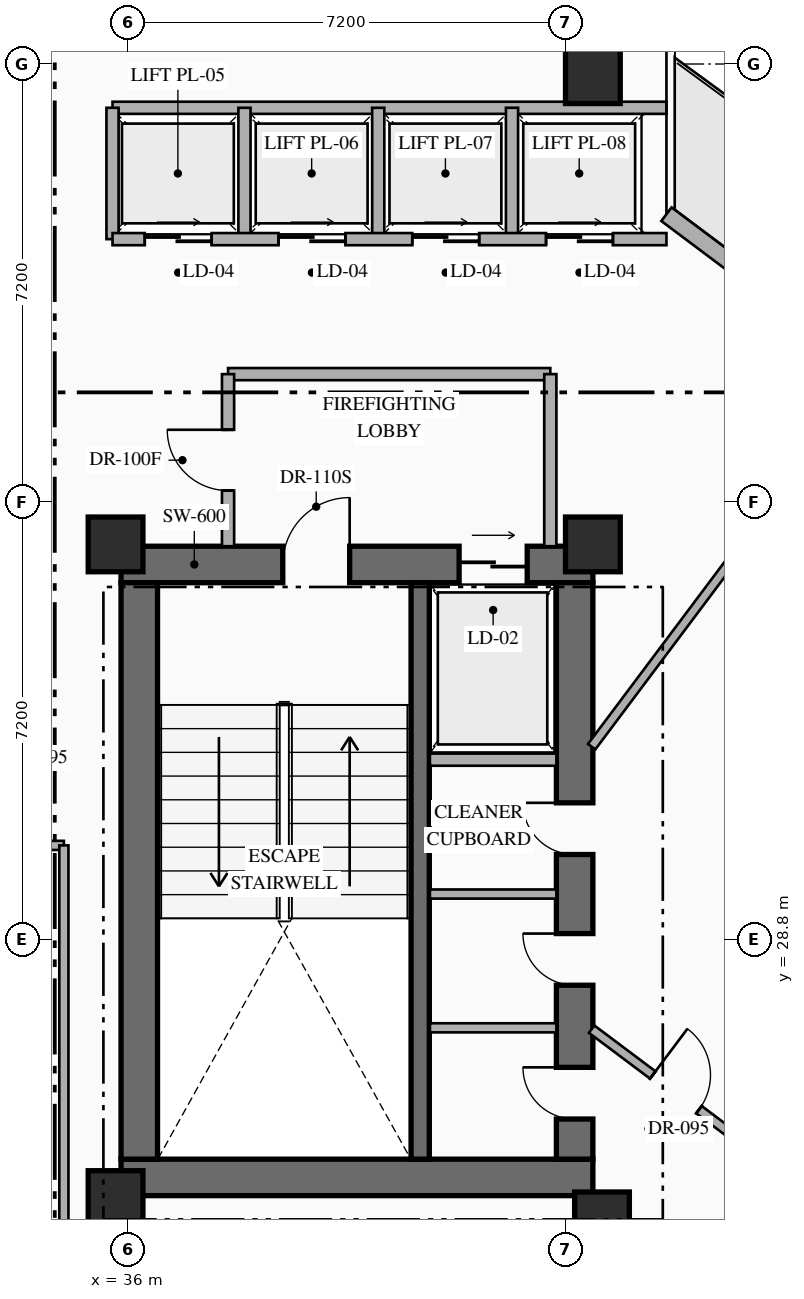
"""IFC4 building model, lengths in metres.
Left out: names, types, materials, properties, quantities, classifications, styles, units other than length and angle.
Written with IfcOpenShell. Run it as: python <this file> out.ifc"""

import sys

from ifc_helpers import new_model, si_unit, direction, frame, frame_2d, origin, origin_2d, place, context, subcontext, project, spatial, rectangle, extrude, element, fill, save


model = new_model("IFC4")
c1 = context("Model", 3, precision=1e-05, world=origin(), true_north=direction((0.0, 1.0)))
c2 = subcontext(c1, "Body", "Model", "MODEL_VIEW")
j1 = project(units=[si_unit("LENGTHUNIT", "METRE"), si_unit("PLANEANGLEUNIT", "RADIAN")], contexts=[c1])
p1 = place(None, origin())
s1 = spatial("IfcSite", under=j1, at=p1, CompositionType="ELEMENT")
p2 = place(p1, origin())
s2 = spatial("IfcBuilding", under=s1, at=p2, CompositionType="ELEMENT")
p3 = place(p2, frame((0.0, 0.0, 138.45)))
s3 = spatial("IfcBuildingStorey", under=s2, at=p3, CompositionType="ELEMENT", Elevation=138.45)
p4 = place(p3, frame((35.89, 24.89, 0.0), z_axis=(0.0, 0.0, 1.0), x_axis=(1.0, 0.0, 0.0)))
e1 = element("IfcWall", 1, at=p4, inside=s3, PredefinedType="SHEAR", context=c2, shape_type="SweptSolid", body=[
    extrude(rectangle(XDim=7.76, YDim=0.6, at=frame_2d((3.88, 0.0))), origin(), (0.0, 0.0, 1.0), 3.6),
])
p5 = place(p3, frame((35.89, 34.97, 0.0), z_axis=(0.0, 0.0, 1.0), x_axis=(1.0, 0.0, 0.0)))
e2 = element("IfcWall", 2, at=p5, inside=s3, PredefinedType="SHEAR", context=c2, shape_type="SweptSolid", body=[
    extrude(rectangle(XDim=7.76, YDim=0.6, at=frame_2d((3.88, 0.0))), origin(), (0.0, 0.0, 1.0), 3.6),
])
p6 = place(p5, frame((2.66, 0.0, 0.0)))
e3 = element("IfcOpeningElement", 3, at=p6, cuts=e2, PredefinedType="OPENING", context=c2, shape_type="SweptSolid", body=[
    extrude(rectangle(XDim=1.1, YDim=2.2, at=frame_2d((0.55, 1.1))), frame((0.0, 0.31, 0.0), z_axis=(0.0, -1.0, 0.0), x_axis=(1.0, 0.0, 0.0)), (0.0, 0.0, 1.0), 0.62),
])
p7 = place(p5, frame((5.56, 0.0, 0.0)))
e4 = element("IfcOpeningElement", 4, at=p7, cuts=e2, PredefinedType="OPENING", context=c2, shape_type="SweptSolid", body=[
    extrude(rectangle(XDim=1.12, YDim=2.15, at=frame_2d((0.56, 1.075))), frame((0.0, 0.31, 0.0), z_axis=(0.0, -1.0, 0.0), x_axis=(1.0, 0.0, 0.0)), (0.0, 0.0, 1.0), 0.62),
])
p8 = place(p3, frame((36.19, 25.19, 0.0), z_axis=(0.0, 0.0, 1.0), x_axis=(0.0, 1.0, 0.0)))
e5 = element("IfcWall", 5, at=p8, inside=s3, PredefinedType="SHEAR", context=c2, shape_type="SweptSolid", body=[
    extrude(rectangle(XDim=9.48, YDim=0.6, at=frame_2d((4.74, 0.0))), origin(), (0.0, 0.0, 1.0), 3.6),
])
p9 = place(p3, frame((43.35, 25.19, 0.0), z_axis=(0.0, 0.0, 1.0), x_axis=(0.0, 1.0, 0.0)))
e6 = element("IfcWall", 6, at=p9, inside=s3, PredefinedType="SHEAR", context=c2, shape_type="SweptSolid", body=[
    extrude(rectangle(XDim=9.48, YDim=0.6, at=frame_2d((4.74, 0.0))), origin(), (0.0, 0.0, 1.0), 3.6),
])
p10 = place(p9, frame((0.66, 0.0, 0.0)))
e7 = element("IfcOpeningElement", 7, at=p10, cuts=e6, PredefinedType="OPENING", context=c2, shape_type="SweptSolid", body=[
    extrude(rectangle(XDim=0.85, YDim=2.08, at=frame_2d((0.425, 1.04))), frame((0.0, 0.31, 0.0), z_axis=(0.0, -1.0, 0.0), x_axis=(1.0, 0.0, 0.0)), (0.0, 0.0, 1.0), 0.62),
])
p11 = place(p9, frame((2.86, 0.0, 0.0)))
e8 = element("IfcOpeningElement", 8, at=p11, cuts=e6, PredefinedType="OPENING", context=c2, shape_type="SweptSolid", body=[
    extrude(rectangle(XDim=0.85, YDim=2.08, at=frame_2d((0.425, 1.04))), frame((0.0, 0.31, 0.0), z_axis=(0.0, -1.0, 0.0), x_axis=(1.0, 0.0, 0.0)), (0.0, 0.0, 1.0), 0.62),
])
p12 = place(p9, frame((5.01, 0.0, 0.0)))
e9 = element("IfcOpeningElement", 9, at=p12, cuts=e6, PredefinedType="OPENING", context=c2, shape_type="SweptSolid", body=[
    extrude(rectangle(XDim=0.85, YDim=2.08, at=frame_2d((0.425, 1.04))), frame((0.0, 0.31, 0.0), z_axis=(0.0, -1.0, 0.0), x_axis=(1.0, 0.0, 0.0)), (0.0, 0.0, 1.0), 0.62),
])
p13 = place(p3, frame((40.81, 25.19, 0.0), z_axis=(0.0, 0.0, 1.0), x_axis=(0.0, 1.0, 0.0)))
e10 = element("IfcWall", 10, at=p13, inside=s3, PredefinedType="SHEAR", context=c2, shape_type="SweptSolid", body=[
    extrude(rectangle(XDim=9.48, YDim=0.3, at=frame_2d((4.74, 0.0))), origin(), (0.0, 0.0, 1.0), 3.6),
])
for number, where, z_axis, x_axis in (
    (11, (35.8, 24.55, 0.0), (0.0, 0.0, 1.0), (1.0, 0.0, 0.0)),
    (12, (43.8, 24.2, 0.0), (0.0, 0.0, 1.0), (1.0, 0.0, 0.0)),
    (13, (35.8, 35.3, 0.0), (0.0, 0.0, 1.0), (1.0, 0.0, 0.0)),
    (14, (43.65, 35.3, 0.0), (0.0, 0.0, 1.0), (1.0, 0.0, 0.0)),
    (15, (43.65, 43.0, 0.0), (0.0, 0.0, 1.0), (1.0, 0.0, 0.0)),
):
    element("IfcColumn", number, at=place(p3, frame(where, z_axis=z_axis, x_axis=x_axis)), inside=s3, PredefinedType="COLUMN", context=c2, shape_type="SweptSolid", body=[
        extrude(rectangle(XDim=0.9, YDim=0.9, at=origin_2d()), origin(), (0.0, 0.0, 1.0), 3.6),
    ])
p14 = place(p3, frame((44.86, 40.73, 0.0), z_axis=(0.0, 0.0, 1.0), x_axis=(0.800007624502, -0.599989833863, 0.0)))
e16 = element("IfcWall", 16, at=p14, inside=s3, PredefinedType="STANDARD", context=c2, shape_type="SweptSolid", body=[
    extrude(rectangle(XDim=19.212, YDim=0.28, at=frame_2d((9.606, 0.0))), origin(), (0.0, 0.0, 1.0), 3.35),
])
p15 = place(p14, frame((1.755, 0.0, 0.0)))
e17 = element("IfcOpeningElement", 17, at=p15, cuts=e16, PredefinedType="OPENING", context=c2, shape_type="SweptSolid", body=[
    extrude(rectangle(XDim=1.1, YDim=2.2, at=frame_2d((0.55, 1.1))), frame((0.0, 0.15, 0.0), z_axis=(0.0, -1.0, 0.0), x_axis=(1.0, 0.0, 0.0)), (0.0, 0.0, 1.0), 0.3),
])
p16 = place(p14, frame((13.509, 0.0, 0.85)))
e18 = element("IfcOpeningElement", 18, at=p16, cuts=e16, PredefinedType="OPENING", context=c2, shape_type="SweptSolid", body=[
    extrude(rectangle(XDim=1.8, YDim=2.1, at=frame_2d((0.9, 1.05))), frame((0.0, 0.15, 0.0), z_axis=(0.0, -1.0, 0.0), x_axis=(1.0, 0.0, 0.0)), (0.0, 0.0, 1.0), 0.3),
])
p17 = place(p3, frame((40.97, 31.76, 0.0), z_axis=(0.0, 0.0, 1.0), x_axis=(1.0, 0.0, 0.0)))
e19 = element("IfcWall", 19, at=p17, inside=s3, PredefinedType="STANDARD", context=c2, shape_type="SweptSolid", body=[
    extrude(rectangle(XDim=2.08, YDim=0.2, at=frame_2d((1.04, 0.0))), origin(), (0.0, 0.0, 1.0), 3.35),
])
for number, where, z_axis, x_axis in (
    (20, (40.97, 27.35, 0.0), (0.0, 0.0, 1.0), (1.0, 0.0, 0.0)),
    (21, (40.97, 29.55, 0.0), (0.0, 0.0, 1.0), (1.0, 0.0, 0.0)),
):
    element("IfcWall", number, at=place(p3, frame(where, z_axis=z_axis, x_axis=x_axis)), inside=s3, PredefinedType="PARTITIONING", context=c2, shape_type="SweptSolid", body=[
        extrude(rectangle(XDim=2.08, YDim=0.15, at=frame_2d((1.04, 0.0))), origin(), (0.0, 0.0, 1.0), 3.35),
    ])
p18 = place(p3, frame((37.65, 38.1, 0.0), z_axis=(0.0, 0.0, 1.0), x_axis=(1.0, 0.0, 0.0)))
e22 = element("IfcWall", 22, at=p18, inside=s3, PredefinedType="STANDARD", context=c2, shape_type="SweptSolid", body=[
    extrude(rectangle(XDim=5.3, YDim=0.2, at=frame_2d((2.65, 0.0))), origin(), (0.0, 0.0, 1.0), 3.35),
])
p19 = place(p3, frame((42.95, 35.27, 0.0), z_axis=(0.0, 0.0, 1.0), x_axis=(0.0, 1.0, 0.0)))
e23 = element("IfcWall", 23, at=p19, inside=s3, PredefinedType="STANDARD", context=c2, shape_type="SweptSolid", body=[
    extrude(rectangle(XDim=2.83, YDim=0.2, at=frame_2d((1.415, 0.0))), origin(), (0.0, 0.0, 1.0), 3.35),
])
p20 = place(p3, frame((37.65, 35.27, 0.0), z_axis=(0.0, 0.0, 1.0), x_axis=(0.0, 1.0, 0.0)))
e24 = element("IfcWall", 24, at=p20, inside=s3, PredefinedType="STANDARD", context=c2, shape_type="SweptSolid", body=[
    extrude(rectangle(XDim=2.83, YDim=0.2, at=frame_2d((1.415, 0.0))), origin(), (0.0, 0.0, 1.0), 3.35),
])
p21 = place(p20, frame((0.915, 0.0, 0.0)))
e25 = element("IfcOpeningElement", 25, at=p21, cuts=e24, PredefinedType="OPENING", context=c2, shape_type="SweptSolid", body=[
    extrude(rectangle(XDim=1.0, YDim=2.2, at=frame_2d((0.5, 1.1))), frame((0.0, 0.11, 0.0), z_axis=(0.0, -1.0, 0.0), x_axis=(1.0, 0.0, 0.0)), (0.0, 0.0, 1.0), 0.22),
])
p22 = place(p3, frame((35.75, 42.48, 0.0), z_axis=(0.0, 0.0, 1.0), x_axis=(1.0, 0.0, 0.0)))
e26 = element("IfcWall", 26, at=p22, inside=s3, PredefinedType="STANDARD", context=c2, shape_type="SweptSolid", body=[
    extrude(rectangle(XDim=9.11, YDim=0.2, at=frame_2d((4.555, 0.0))), origin(), (0.0, 0.0, 1.0), 3.35),
])
for number, where, z_axis, x_axis in (
    (27, (35.75, 40.32, 0.0), (0.0, 0.0, 1.0), (0.0, 1.0, 0.0)),
    (28, (37.92, 40.32, 0.0), (0.0, 0.0, 1.0), (0.0, 1.0, 0.0)),
    (29, (40.12, 40.32, 0.0), (0.0, 0.0, 1.0), (0.0, 1.0, 0.0)),
    (30, (42.32, 40.32, 0.0), (0.0, 0.0, 1.0), (0.0, 1.0, 0.0)),
):
    element("IfcWall", number, at=place(p3, frame(where, z_axis=z_axis, x_axis=x_axis)), inside=s3, PredefinedType="STANDARD", context=c2, shape_type="SweptSolid", body=[
        extrude(rectangle(XDim=2.16, YDim=0.2, at=frame_2d((1.08, 0.0))), origin(), (0.0, 0.0, 1.0), 3.35),
    ])
p23 = place(p3, frame((35.75, 40.32, 0.0), z_axis=(0.0, 0.0, 1.0), x_axis=(1.0, 0.0, 0.0)))
e31 = element("IfcWall", 31, at=p23, inside=s3, PredefinedType="STANDARD", context=c2, shape_type="SweptSolid", body=[
    extrude(rectangle(XDim=9.11, YDim=0.2, at=frame_2d((4.555, 0.0))), origin(), (0.0, 0.0, 1.0), 3.35),
])
p24 = place(p23, frame((0.53, 0.0, 0.0)))
e32 = element("IfcOpeningElement", 32, at=p24, cuts=e31, PredefinedType="OPENING", context=c2, shape_type="SweptSolid", body=[
    extrude(rectangle(XDim=1.1, YDim=2.18, at=frame_2d((0.55, 1.09))), frame((0.0, 0.11, 0.0), z_axis=(0.0, -1.0, 0.0), x_axis=(1.0, 0.0, 0.0)), (0.0, 0.0, 1.0), 0.22),
])
p25 = place(p23, frame((2.73, 0.0, 0.0)))
e33 = element("IfcOpeningElement", 33, at=p25, cuts=e31, PredefinedType="OPENING", context=c2, shape_type="SweptSolid", body=[
    extrude(rectangle(XDim=1.1, YDim=2.18, at=frame_2d((0.55, 1.09))), frame((0.0, 0.11, 0.0), z_axis=(0.0, -1.0, 0.0), x_axis=(1.0, 0.0, 0.0)), (0.0, 0.0, 1.0), 0.22),
])
p26 = place(p23, frame((4.93, 0.0, 0.0)))
e34 = element("IfcOpeningElement", 34, at=p26, cuts=e31, PredefinedType="OPENING", context=c2, shape_type="SweptSolid", body=[
    extrude(rectangle(XDim=1.1, YDim=2.18, at=frame_2d((0.55, 1.09))), frame((0.0, 0.11, 0.0), z_axis=(0.0, -1.0, 0.0), x_axis=(1.0, 0.0, 0.0)), (0.0, 0.0, 1.0), 0.22),
])
p27 = place(p23, frame((7.13, 0.0, 0.0)))
e35 = element("IfcOpeningElement", 35, at=p27, cuts=e31, PredefinedType="OPENING", context=c2, shape_type="SweptSolid", body=[
    extrude(rectangle(XDim=1.1, YDim=2.18, at=frame_2d((0.55, 1.09))), frame((0.0, 0.11, 0.0), z_axis=(0.0, -1.0, 0.0), x_axis=(1.0, 0.0, 0.0)), (0.0, 0.0, 1.0), 0.22),
])
p28 = place(p3, frame((30.5, 30.35, 0.0), z_axis=(0.0, 0.0, 1.0), x_axis=(1.0, 0.0, 0.0)))
e36 = element("IfcWall", 36, at=p28, inside=s3, PredefinedType="PARTITIONING", context=c2, shape_type="SweptSolid", body=[
    extrude(rectangle(XDim=4.45, YDim=0.15, at=frame_2d((2.225, 0.0))), origin(), (0.0, 0.0, 1.0), 3.35),
])
p29 = place(p28, frame((2.846, 0.0, 0.0)))
e37 = element("IfcOpeningElement", 37, at=p29, cuts=e36, PredefinedType="OPENING", context=c2, shape_type="SweptSolid", body=[
    extrude(rectangle(XDim=0.95, YDim=2.15, at=frame_2d((0.475, 1.075))), frame((0.0, 0.085, 0.0), z_axis=(0.0, -1.0, 0.0), x_axis=(1.0, 0.0, 0.0)), (0.0, 0.0, 1.0), 0.17),
])
p30 = place(p3, frame((34.95, 23.2, 0.0), z_axis=(0.0, 0.0, 1.0), x_axis=(0.0, 1.0, 0.0)))
e38 = element("IfcWall", 38, at=p30, inside=s3, PredefinedType="PARTITIONING", context=c2, shape_type="SweptSolid", body=[
    extrude(rectangle(XDim=7.15, YDim=0.15, at=frame_2d((3.575, 0.0))), origin(), (0.0, 0.0, 1.0), 3.35),
])
p31 = place(p3, frame((41.87, 17.96, 0.0), z_axis=(0.0, 0.0, 1.0), x_axis=(0.599995730889, 0.800003201816, 0.0)))
e39 = element("IfcWall", 39, at=p31, inside=s3, PredefinedType="PARTITIONING", context=c2, shape_type="SweptSolid", body=[
    extrude(rectangle(XDim=9.15, YDim=0.15, at=frame_2d((4.575, 0.0))), origin(), (0.0, 0.0, 1.0), 3.35),
])
p32 = place(p31, frame((4.1, 0.0, 0.0)))
e40 = element("IfcOpeningElement", 40, at=p32, cuts=e39, PredefinedType="OPENING", context=c2, shape_type="SweptSolid", body=[
    extrude(rectangle(XDim=0.95, YDim=2.15, at=frame_2d((0.475, 1.075))), frame((0.0, 0.085, 0.0), z_axis=(0.0, -1.0, 0.0), x_axis=(1.0, 0.0, 0.0)), (0.0, 0.0, 1.0), 0.17),
])
p33 = place(p3, frame((43.63, 27.328, 0.0), z_axis=(0.0, 0.0, 1.0), x_axis=(0.799972182084, -0.600037088764, 0.0)))
e41 = element("IfcWall", 41, at=p33, inside=s3, PredefinedType="PARTITIONING", context=c2, shape_type="SweptSolid", body=[
    extrude(rectangle(XDim=4.213, YDim=0.15, at=frame_2d((2.106, 0.0))), origin(), (0.0, 0.0, 1.0), 3.045),
])
p34 = place(p33, frame((1.256, 0.0, 0.0)))
e42 = element("IfcOpeningElement", 42, at=p34, cuts=e41, PredefinedType="OPENING", context=c2, shape_type="SweptSolid", body=[
    extrude(rectangle(XDim=0.95, YDim=2.15, at=frame_2d((0.475, 1.075))), frame((0.0, 0.085, 0.0), z_axis=(0.0, -1.0, 0.0), x_axis=(1.0, 0.0, 0.0)), (0.0, 0.0, 1.0), 0.17),
])
p35 = place(p3, frame((43.63, 31.973, 0.0), z_axis=(0.0, 0.0, 1.0), x_axis=(0.599975099311, 0.800018674911, 0.0)))
e43 = element("IfcWall", 43, at=p35, inside=s3, PredefinedType="PARTITIONING", context=c2, shape_type="SweptSolid", body=[
    extrude(rectangle(XDim=7.844, YDim=0.15, at=frame_2d((3.922, 0.0))), origin(), (0.0, 0.0, 1.0), 3.35),
])
p36 = place(p3, frame((27.91, 26.68, 0.0), z_axis=(0.0, 0.0, 1.0), x_axis=(0.800005938517, -0.599992081896, 0.0)))
e44 = element("IfcWall", 44, at=p36, inside=s3, PredefinedType="PARTITIONING", context=c2, shape_type="SweptSolid", body=[
    extrude(rectangle(XDim=14.8, YDim=0.15, at=frame_2d((7.4, 0.0))), origin(), (0.0, 0.0, 1.0), 3.35),
])
p37 = place(p36, frame((9.281, 0.0, 0.0)))
e45 = element("IfcOpeningElement", 45, at=p37, cuts=e44, PredefinedType="OPENING", context=c2, shape_type="SweptSolid", body=[
    extrude(rectangle(XDim=0.95, YDim=2.15, at=frame_2d((0.475, 1.075))), frame((0.0, 0.085, 0.0), z_axis=(0.0, -1.0, 0.0), x_axis=(1.0, 0.0, 0.0)), (0.0, 0.0, 1.0), 0.17),
])
p38 = place(p6, origin())
e46 = element("IfcDoor", 46, at=p38, inside=s3, OperationType="SINGLE_SWING_RIGHT", PredefinedType="DOOR", context=c2, shape_type="SweptSolid", body=[
    extrude(rectangle(XDim=1.1, YDim=2.2, at=frame_2d((0.55, 1.1))), frame((0.0, 0.025, 0.0), z_axis=(0.0, -1.0, 0.0), x_axis=(1.0, 0.0, 0.0)), (0.0, 0.0, 1.0), 0.05),
])
fill(e3, e46)
p39 = place(p7, origin())
e47 = element("IfcDoor", 47, at=p39, inside=s3, OperationType="SLIDING_TO_RIGHT", PredefinedType="USERDEFINED", context=c2, shape_type="SweptSolid", body=[
    extrude(rectangle(XDim=1.12, YDim=2.15, at=frame_2d((0.56, 1.075))), frame((0.0, 0.025, 0.0), z_axis=(0.0, -1.0, 0.0), x_axis=(1.0, 0.0, 0.0)), (0.0, 0.0, 1.0), 0.05),
])
fill(e4, e47)
p40 = place(p10, origin())
e48 = element("IfcDoor", 48, at=p40, inside=s3, OperationType="SINGLE_SWING_RIGHT", PredefinedType="DOOR", context=c2, shape_type="SweptSolid", body=[
    extrude(rectangle(XDim=0.85, YDim=2.08, at=frame_2d((0.425, 1.04))), frame((0.0, 0.025, 0.0), z_axis=(0.0, -1.0, 0.0), x_axis=(1.0, 0.0, 0.0)), (0.0, 0.0, 1.0), 0.05),
])
fill(e7, e48)
p41 = place(p11, origin())
e49 = element("IfcDoor", 49, at=p41, inside=s3, OperationType="SINGLE_SWING_RIGHT", PredefinedType="DOOR", context=c2, shape_type="SweptSolid", body=[
    extrude(rectangle(XDim=0.85, YDim=2.08, at=frame_2d((0.425, 1.04))), frame((0.0, 0.025, 0.0), z_axis=(0.0, -1.0, 0.0), x_axis=(1.0, 0.0, 0.0)), (0.0, 0.0, 1.0), 0.05),
])
fill(e8, e49)
p42 = place(p12, origin())
e50 = element("IfcDoor", 50, at=p42, inside=s3, OperationType="SINGLE_SWING_RIGHT", PredefinedType="DOOR", context=c2, shape_type="SweptSolid", body=[
    extrude(rectangle(XDim=0.85, YDim=2.08, at=frame_2d((0.425, 1.04))), frame((0.0, 0.025, 0.0), z_axis=(0.0, -1.0, 0.0), x_axis=(1.0, 0.0, 0.0)), (0.0, 0.0, 1.0), 0.05),
])
fill(e9, e50)
p43 = place(p21, origin())
e51 = element("IfcDoor", 51, at=p43, inside=s3, OperationType="SINGLE_SWING_RIGHT", PredefinedType="DOOR", context=c2, shape_type="SweptSolid", body=[
    extrude(rectangle(XDim=1.0, YDim=2.2, at=frame_2d((0.5, 1.1))), frame((0.0, 0.025, 0.0), z_axis=(0.0, -1.0, 0.0), x_axis=(1.0, 0.0, 0.0)), (0.0, 0.0, 1.0), 0.05),
])
fill(e25, e51)
p44 = place(p24, origin())
e52 = element("IfcDoor", 52, at=p44, inside=s3, OperationType="SLIDING_TO_RIGHT", PredefinedType="USERDEFINED", context=c2, shape_type="SweptSolid", body=[
    extrude(rectangle(XDim=1.1, YDim=2.18, at=frame_2d((0.55, 1.09))), frame((0.0, 0.025, 0.0), z_axis=(0.0, -1.0, 0.0), x_axis=(1.0, 0.0, 0.0)), (0.0, 0.0, 1.0), 0.05),
])
fill(e32, e52)
p45 = place(p25, origin())
e53 = element("IfcDoor", 53, at=p45, inside=s3, OperationType="SLIDING_TO_RIGHT", PredefinedType="USERDEFINED", context=c2, shape_type="SweptSolid", body=[
    extrude(rectangle(XDim=1.1, YDim=2.18, at=frame_2d((0.55, 1.09))), frame((0.0, 0.025, 0.0), z_axis=(0.0, -1.0, 0.0), x_axis=(1.0, 0.0, 0.0)), (0.0, 0.0, 1.0), 0.05),
])
fill(e33, e53)
p46 = place(p26, origin())
e54 = element("IfcDoor", 54, at=p46, inside=s3, OperationType="SLIDING_TO_RIGHT", PredefinedType="USERDEFINED", context=c2, shape_type="SweptSolid", body=[
    extrude(rectangle(XDim=1.1, YDim=2.18, at=frame_2d((0.55, 1.09))), frame((0.0, 0.025, 0.0), z_axis=(0.0, -1.0, 0.0), x_axis=(1.0, 0.0, 0.0)), (0.0, 0.0, 1.0), 0.05),
])
fill(e34, e54)
p47 = place(p27, origin())
e55 = element("IfcDoor", 55, at=p47, inside=s3, OperationType="SLIDING_TO_RIGHT", PredefinedType="USERDEFINED", context=c2, shape_type="SweptSolid", body=[
    extrude(rectangle(XDim=1.1, YDim=2.18, at=frame_2d((0.55, 1.09))), frame((0.0, 0.025, 0.0), z_axis=(0.0, -1.0, 0.0), x_axis=(1.0, 0.0, 0.0)), (0.0, 0.0, 1.0), 0.05),
])
fill(e35, e55)
p48 = place(p34, origin())
e56 = element("IfcDoor", 56, at=p48, inside=s3, OperationType="SINGLE_SWING_LEFT", PredefinedType="DOOR", context=c2, shape_type="SweptSolid", body=[
    extrude(rectangle(XDim=0.95, YDim=2.15, at=frame_2d((0.475, 1.075))), frame((0.0, 0.025, 0.0), z_axis=(0.0, -1.0, 0.0), x_axis=(1.0, 0.0, 0.0)), (0.0, 0.0, 1.0), 0.05),
])
fill(e42, e56)
save(model, sys.argv[1])
